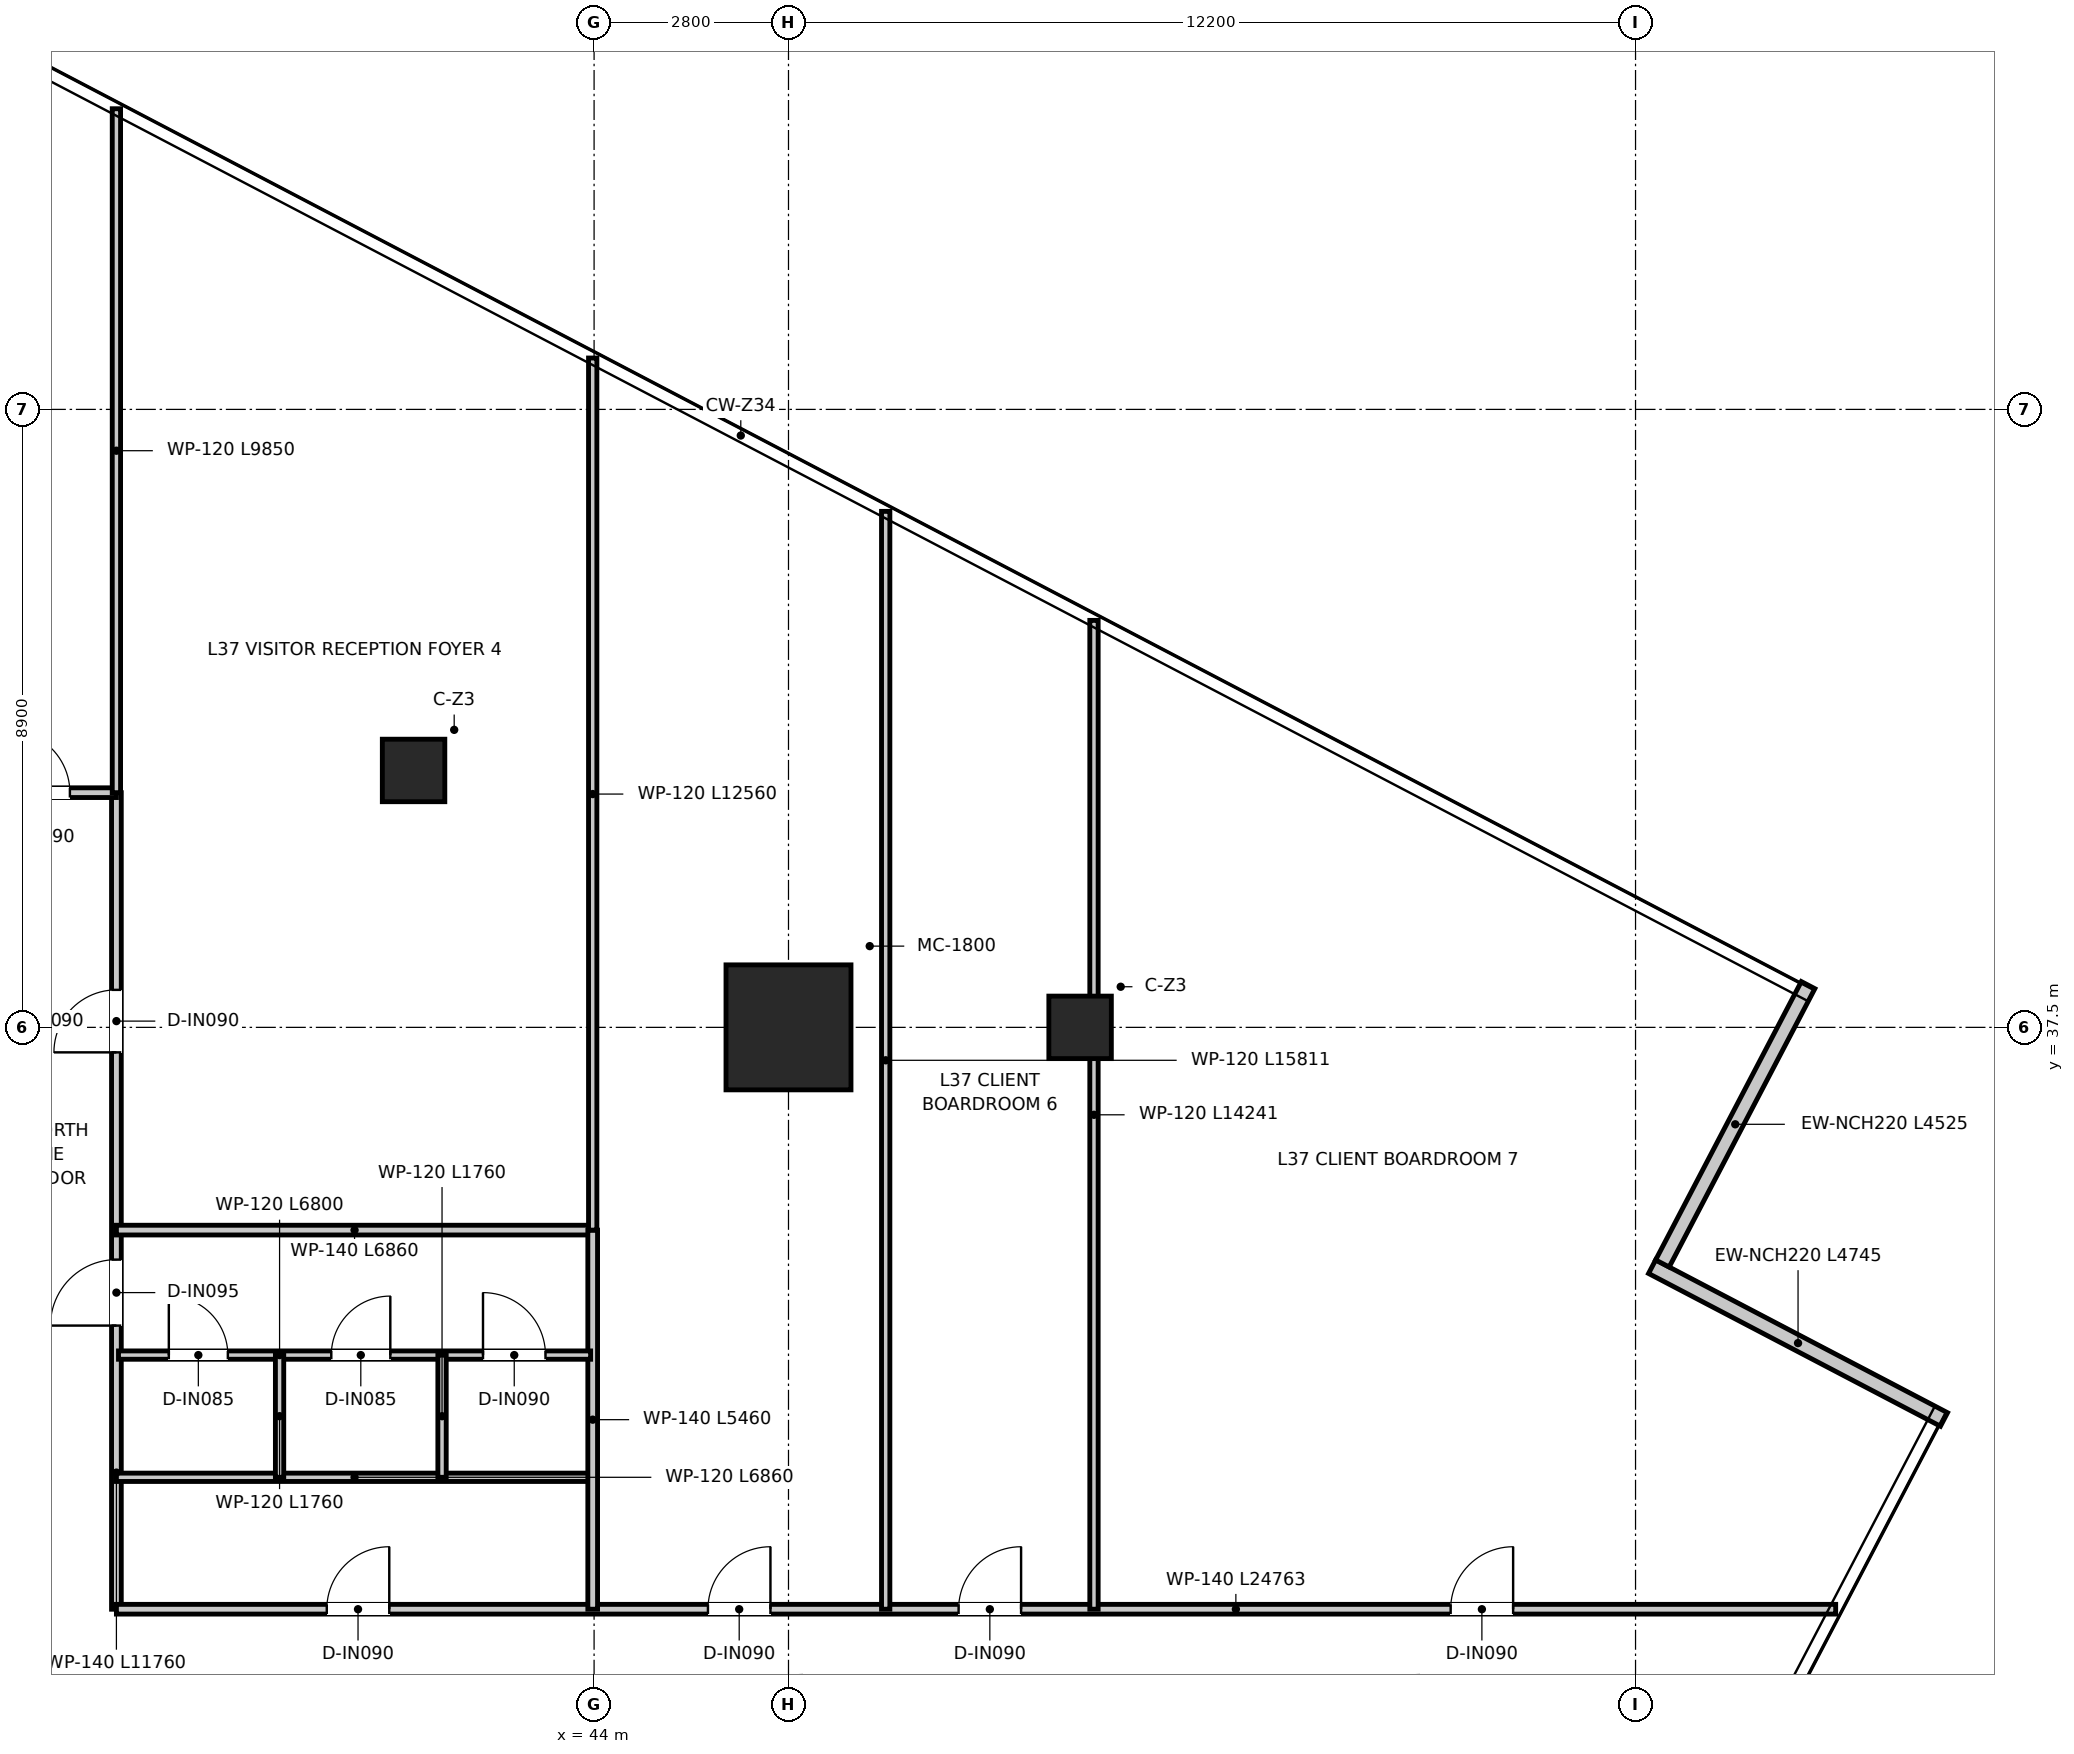
"""IFC4 building model, lengths in metres.
Left out: names, types, materials, properties, quantities, classifications, styles, units other than length and angle.
Written with IfcOpenShell. Run it as: python <this file> out.ifc"""

import sys

from ifc_helpers import new_model, si_unit, direction, frame, frame_2d, origin, origin_2d, place, context, subcontext, project, spatial, rectangle, extrude, source, transform, mapped, element, fill, save


model = new_model("IFC4")
c1 = context("Model", 3, precision=1e-05, world=origin(), true_north=direction((0.0, 1.0)))
c2 = subcontext(c1, "Body", "Model", "MODEL_VIEW")
j1 = project(units=[si_unit("LENGTHUNIT", "METRE"), si_unit("PLANEANGLEUNIT", "RADIAN")], contexts=[c1])
p1 = place(None, origin())
s1 = spatial("IfcSite", under=j1, at=p1, CompositionType="ELEMENT")
p2 = place(p1, origin())
s2 = spatial("IfcBuilding", under=s1, at=p2, CompositionType="ELEMENT")
p3 = place(p2, frame((0.0, 0.0, 154.1)))
s3 = spatial("IfcBuildingStorey", under=s2, at=p3, CompositionType="ELEMENT", Elevation=154.1)
m1 = source(origin(), c2, "Body", "SweptSolid", [
    extrude(rectangle(XDim=1.8, YDim=1.8, at=origin_2d()), origin(), (0.0, 0.0, 1.0), 3.95),
])
p4 = place(p3, frame((46.8, 37.5, 0.0), z_axis=(0.0, 0.0, 1.0), x_axis=(1.0, 0.0, 0.0)))
e1 = element("IfcColumn", 1, at=p4, inside=s3, PredefinedType="USERDEFINED", context=c2, shape_type="MappedRepresentation", body=[
    mapped(m1, transform((0.0, 0.0, 0.0), x_axis=(1.0, 0.0, 0.0), y_axis=(0.0, 1.0, 0.0), z_axis=(0.0, 0.0, 1.0), scale=1.0)),
])
m2 = source(origin(), c2, "Body", "SweptSolid", [
    extrude(rectangle(XDim=0.9, YDim=0.9, at=origin_2d()), origin(), (0.0, 0.0, 1.0), 3.95),
])
for number, where, z_axis, x_axis in (
    (2, (41.4, 41.2, 0.0), (0.0, 0.0, 1.0), (1.0, 0.0, 0.0)),
    (3, (51.0, 37.5, 0.0), (0.0, 0.0, 1.0), (1.0, 0.0, 0.0)),
):
    element("IfcColumn", number, at=place(p3, frame(where, z_axis=z_axis, x_axis=x_axis)), inside=s3, PredefinedType="COLUMN", context=c2, shape_type="MappedRepresentation", body=[
        mapped(m2, transform((0.0, 0.0, 0.0), x_axis=(1.0, 0.0, 0.0), y_axis=(0.0, 1.0, 0.0), z_axis=(0.0, 0.0, 1.0), scale=1.0)),
    ])
p5 = place(p3, frame((63.443, 31.853, 0.0), z_axis=(0.0, 0.0, 1.0), x_axis=(-0.886000663224, 0.463683970788, 0.0)))
e4 = element("IfcWall", 4, at=p5, inside=s3, PredefinedType="ELEMENTEDWALL", context=c2, shape_type="SweptSolid", body=[
    extrude(rectangle(XDim=4.745, YDim=0.22, at=frame_2d((2.373, 0.0))), origin(), (0.0, 0.0, 1.0), 3.67),
])
p6 = place(p3, frame((59.387, 34.099, 0.0), z_axis=(0.0, 0.0, 1.0), x_axis=(0.463690434653, 0.885997280363, 0.0)))
e5 = element("IfcWall", 5, at=p6, inside=s3, PredefinedType="ELEMENTEDWALL", context=c2, shape_type="SweptSolid", body=[
    extrude(rectangle(XDim=4.525, YDim=0.22, at=frame_2d((2.262, 0.0))), origin(), (0.0, 0.0, 1.0), 3.67),
])
p7 = place(p3, frame((37.12, 29.12, 0.0), z_axis=(0.0, 0.0, 1.0), x_axis=(0.0, 1.0, 0.0)))
e6 = element("IfcWall", 6, at=p7, inside=s3, PredefinedType="PARTITIONING", context=c2, shape_type="SweptSolid", body=[
    extrude(rectangle(XDim=11.76, YDim=0.14, at=frame_2d((5.88, 0.0))), origin(), (0.0, 0.0, 1.0), 3.03),
])
p8 = place(p7, frame((4.085, 0.0, 0.0)))
e7 = element("IfcOpeningElement", 7, at=p8, cuts=e6, PredefinedType="OPENING", context=c2, shape_type="SweptSolid", body=[
    extrude(rectangle(XDim=0.95, YDim=2.1, at=frame_2d((0.475, 1.05))), frame((0.0, 0.08, 0.0), z_axis=(0.0, -1.0, 0.0), x_axis=(1.0, 0.0, 0.0)), (0.0, 0.0, 1.0), 0.16),
])
p9 = place(p7, frame((8.02, 0.0, 0.0)))
e8 = element("IfcOpeningElement", 8, at=p9, cuts=e6, PredefinedType="OPENING", context=c2, shape_type="SweptSolid", body=[
    extrude(rectangle(XDim=0.9, YDim=2.1, at=frame_2d((0.45, 1.05))), frame((0.0, 0.08, 0.0), z_axis=(0.0, -1.0, 0.0), x_axis=(1.0, 0.0, 0.0)), (0.0, 0.0, 1.0), 0.16),
])
p10 = place(p3, frame((34.88, 40.88, 0.0), z_axis=(0.0, 0.0, 1.0), x_axis=(1.0, 0.0, 0.0)))
e9 = element("IfcWall", 9, at=p10, inside=s3, PredefinedType="PARTITIONING", context=c2, shape_type="SweptSolid", body=[
    extrude(rectangle(XDim=2.24, YDim=0.14, at=frame_2d((1.12, 0.0))), origin(), (0.0, 0.0, 1.0), 3.67),
])
p11 = place(p10, frame((0.67, 0.0, 0.0)))
e10 = element("IfcOpeningElement", 10, at=p11, cuts=e9, PredefinedType="OPENING", context=c2, shape_type="SweptSolid", body=[
    extrude(rectangle(XDim=0.9, YDim=2.1, at=frame_2d((0.45, 1.05))), frame((0.0, 0.08, 0.0), z_axis=(0.0, -1.0, 0.0), x_axis=(1.0, 0.0, 0.0)), (0.0, 0.0, 1.0), 0.16),
])
p12 = place(p3, frame((37.12, 29.12, 0.0), z_axis=(0.0, 0.0, 1.0), x_axis=(1.0, 0.0, 0.0)))
e11 = element("IfcWall", 11, at=p12, inside=s3, PredefinedType="PARTITIONING", context=c2, shape_type="SweptSolid", body=[
    extrude(rectangle(XDim=24.763, YDim=0.14, at=frame_2d((12.381, 0.0))), origin(), (0.0, 0.0, 1.0), 3.03),
])
p13 = place(p12, frame((3.03, 0.0, 0.0)))
e12 = element("IfcOpeningElement", 12, at=p13, cuts=e11, PredefinedType="OPENING", context=c2, shape_type="SweptSolid", body=[
    extrude(rectangle(XDim=0.9, YDim=2.1, at=frame_2d((0.45, 1.05))), frame((0.0, 0.08, 0.0), z_axis=(0.0, -1.0, 0.0), x_axis=(1.0, 0.0, 0.0)), (0.0, 0.0, 1.0), 0.16),
])
p14 = place(p12, frame((8.52, 0.0, 0.0)))
e13 = element("IfcOpeningElement", 13, at=p14, cuts=e11, PredefinedType="OPENING", context=c2, shape_type="SweptSolid", body=[
    extrude(rectangle(XDim=0.9, YDim=2.1, at=frame_2d((0.45, 1.05))), frame((0.0, 0.08, 0.0), z_axis=(0.0, -1.0, 0.0), x_axis=(1.0, 0.0, 0.0)), (0.0, 0.0, 1.0), 0.16),
])
p15 = place(p12, frame((12.13, 0.0, 0.0)))
e14 = element("IfcOpeningElement", 14, at=p15, cuts=e11, PredefinedType="OPENING", context=c2, shape_type="SweptSolid", body=[
    extrude(rectangle(XDim=0.9, YDim=2.1, at=frame_2d((0.45, 1.05))), frame((0.0, 0.08, 0.0), z_axis=(0.0, -1.0, 0.0), x_axis=(1.0, 0.0, 0.0)), (0.0, 0.0, 1.0), 0.16),
])
p16 = place(p12, frame((19.217, 0.0, 0.0)))
e15 = element("IfcOpeningElement", 15, at=p16, cuts=e11, PredefinedType="OPENING", context=c2, shape_type="SweptSolid", body=[
    extrude(rectangle(XDim=0.9, YDim=2.1, at=frame_2d((0.45, 1.05))), frame((0.0, 0.08, 0.0), z_axis=(0.0, -1.0, 0.0), x_axis=(1.0, 0.0, 0.0)), (0.0, 0.0, 1.0), 0.16),
])
p17 = place(p3, frame((37.12, 31.02, 0.0), z_axis=(0.0, 0.0, 1.0), x_axis=(1.0, 0.0, 0.0)))
e16 = element("IfcWall", 16, at=p17, inside=s3, PredefinedType="PARTITIONING", context=c2, shape_type="SweptSolid", body=[
    extrude(rectangle(XDim=6.86, YDim=0.12, at=frame_2d((3.43, 0.0))), origin(), (0.0, 0.0, 1.0), 3.08),
])
p18 = place(p3, frame((37.12, 34.58, 0.0), z_axis=(0.0, 0.0, 1.0), x_axis=(1.0, 0.0, 0.0)))
e17 = element("IfcWall", 17, at=p18, inside=s3, PredefinedType="PARTITIONING", context=c2, shape_type="SweptSolid", body=[
    extrude(rectangle(XDim=6.86, YDim=0.14, at=frame_2d((3.43, 0.0))), origin(), (0.0, 0.0, 1.0), 3.08),
])
p19 = place(p3, frame((43.98, 29.12, 0.0), z_axis=(0.0, 0.0, 1.0), x_axis=(0.0, 1.0, 0.0)))
e18 = element("IfcWall", 18, at=p19, inside=s3, PredefinedType="PARTITIONING", context=c2, shape_type="SweptSolid", body=[
    extrude(rectangle(XDim=5.46, YDim=0.14, at=frame_2d((2.73, 0.0))), origin(), (0.0, 0.0, 1.0), 3.31),
])
p20 = place(p3, frame((37.15, 32.78, 0.0), z_axis=(0.0, 0.0, 1.0), x_axis=(1.0, 0.0, 0.0)))
e19 = element("IfcWall", 19, at=p20, inside=s3, PredefinedType="PARTITIONING", context=c2, shape_type="SweptSolid", body=[
    extrude(rectangle(XDim=6.8, YDim=0.12, at=frame_2d((3.4, 0.0))), origin(), (0.0, 0.0, 1.0), 3.08),
])
p21 = place(p20, frame((0.725, 0.0, 0.0)))
e20 = element("IfcOpeningElement", 20, at=p21, cuts=e19, PredefinedType="OPENING", context=c2, shape_type="SweptSolid", body=[
    extrude(rectangle(XDim=0.85, YDim=2.1, at=frame_2d((0.425, 1.05))), frame((0.0, 0.07, 0.0), z_axis=(0.0, -1.0, 0.0), x_axis=(1.0, 0.0, 0.0)), (0.0, 0.0, 1.0), 0.14),
])
p22 = place(p20, frame((3.065, 0.0, 0.0)))
e21 = element("IfcOpeningElement", 21, at=p22, cuts=e19, PredefinedType="OPENING", context=c2, shape_type="SweptSolid", body=[
    extrude(rectangle(XDim=0.85, YDim=2.1, at=frame_2d((0.425, 1.05))), frame((0.0, 0.07, 0.0), z_axis=(0.0, -1.0, 0.0), x_axis=(1.0, 0.0, 0.0)), (0.0, 0.0, 1.0), 0.14),
])
p23 = place(p20, frame((5.25, 0.0, 0.0)))
e22 = element("IfcOpeningElement", 22, at=p23, cuts=e19, PredefinedType="OPENING", context=c2, shape_type="SweptSolid", body=[
    extrude(rectangle(XDim=0.9, YDim=2.1, at=frame_2d((0.45, 1.05))), frame((0.0, 0.07, 0.0), z_axis=(0.0, -1.0, 0.0), x_axis=(1.0, 0.0, 0.0)), (0.0, 0.0, 1.0), 0.14),
])
for number, where, z_axis, x_axis in (
    (23, (39.47, 31.02, 0.0), (0.0, 0.0, 1.0), (0.0, 1.0, 0.0)),
    (24, (41.81, 31.02, 0.0), (0.0, 0.0, 1.0), (0.0, 1.0, 0.0)),
):
    element("IfcWall", number, at=place(p3, frame(where, z_axis=z_axis, x_axis=x_axis)), inside=s3, PredefinedType="PARTITIONING", context=c2, shape_type="SweptSolid", body=[
        extrude(rectangle(XDim=1.76, YDim=0.12, at=frame_2d((0.88, 0.0))), origin(), (0.0, 0.0, 1.0), 3.67),
    ])
p24 = place(p3, frame((37.12, 40.88, 0.0), z_axis=(0.0, 0.0, 1.0), x_axis=(0.0, 1.0, 0.0)))
e25 = element("IfcWall", 25, at=p24, inside=s3, PredefinedType="PARTITIONING", context=c2, shape_type="SweptSolid", body=[
    extrude(rectangle(XDim=9.85, YDim=0.12, at=frame_2d((4.925, 0.0))), origin(), (0.0, 0.0, 1.0), 3.28),
])
p25 = place(p3, frame((43.98, 34.58, 0.0), z_axis=(0.0, 0.0, 1.0), x_axis=(0.0, 1.0, 0.0)))
e26 = element("IfcWall", 26, at=p25, inside=s3, PredefinedType="PARTITIONING", context=c2, shape_type="SweptSolid", body=[
    extrude(rectangle(XDim=12.56, YDim=0.12, at=frame_2d((6.28, 0.0))), origin(), (0.0, 0.0, 1.0), 3.03),
])
p26 = place(p3, frame((48.2, 29.12, 0.0), z_axis=(0.0, 0.0, 1.0), x_axis=(0.0, 1.0, 0.0)))
e27 = element("IfcWall", 27, at=p26, inside=s3, PredefinedType="PARTITIONING", context=c2, shape_type="SweptSolid", body=[
    extrude(rectangle(XDim=15.811, YDim=0.12, at=frame_2d((7.906, 0.0))), origin(), (0.0, 0.0, 1.0), 3.08),
])
p27 = place(p3, frame((51.2, 29.12, 0.0), z_axis=(0.0, 0.0, 1.0), x_axis=(0.0, 1.0, 0.0)))
e28 = element("IfcWall", 28, at=p27, inside=s3, PredefinedType="PARTITIONING", context=c2, shape_type="SweptSolid", body=[
    extrude(rectangle(XDim=14.241, YDim=0.12, at=frame_2d((7.121, 0.0))), origin(), (0.0, 0.0, 1.0), 3.28),
])
p28 = place(p13, origin())
e29 = element("IfcDoor", 29, at=p28, inside=s3, OperationType="SINGLE_SWING_RIGHT", PredefinedType="DOOR", context=c2, shape_type="SweptSolid", body=[
    extrude(rectangle(XDim=0.9, YDim=2.1, at=frame_2d((0.45, 1.05))), frame((0.0, 0.025, 0.0), z_axis=(0.0, -1.0, 0.0), x_axis=(1.0, 0.0, 0.0)), (0.0, 0.0, 1.0), 0.05),
])
fill(e12, e29)
p29 = place(p8, origin())
e30 = element("IfcDoor", 30, at=p29, inside=s3, OperationType="SINGLE_SWING_LEFT", PredefinedType="DOOR", context=c2, shape_type="SweptSolid", body=[
    extrude(rectangle(XDim=0.95, YDim=2.1, at=frame_2d((0.475, 1.05))), frame((0.0, 0.025, 0.0), z_axis=(0.0, -1.0, 0.0), x_axis=(1.0, 0.0, 0.0)), (0.0, 0.0, 1.0), 0.05),
])
fill(e7, e30)
p30 = place(p21, origin())
e31 = element("IfcDoor", 31, at=p30, inside=s3, OperationType="SINGLE_SWING_LEFT", PredefinedType="DOOR", context=c2, shape_type="SweptSolid", body=[
    extrude(rectangle(XDim=0.85, YDim=2.1, at=frame_2d((0.425, 1.05))), frame((0.0, 0.025, 0.0), z_axis=(0.0, -1.0, 0.0), x_axis=(1.0, 0.0, 0.0)), (0.0, 0.0, 1.0), 0.05),
])
fill(e20, e31)
p31 = place(p22, origin())
e32 = element("IfcDoor", 32, at=p31, inside=s3, OperationType="SINGLE_SWING_RIGHT", PredefinedType="DOOR", context=c2, shape_type="SweptSolid", body=[
    extrude(rectangle(XDim=0.85, YDim=2.1, at=frame_2d((0.425, 1.05))), frame((0.0, 0.025, 0.0), z_axis=(0.0, -1.0, 0.0), x_axis=(1.0, 0.0, 0.0)), (0.0, 0.0, 1.0), 0.05),
])
fill(e21, e32)
p32 = place(p23, origin())
e33 = element("IfcDoor", 33, at=p32, inside=s3, OperationType="SINGLE_SWING_LEFT", PredefinedType="DOOR", context=c2, shape_type="SweptSolid", body=[
    extrude(rectangle(XDim=0.9, YDim=2.1, at=frame_2d((0.45, 1.05))), frame((0.0, 0.025, 0.0), z_axis=(0.0, -1.0, 0.0), x_axis=(1.0, 0.0, 0.0)), (0.0, 0.0, 1.0), 0.05),
])
fill(e22, e33)
p33 = place(p11, origin())
e34 = element("IfcDoor", 34, at=p33, inside=s3, OperationType="SINGLE_SWING_LEFT", PredefinedType="DOOR", context=c2, shape_type="SweptSolid", body=[
    extrude(rectangle(XDim=0.9, YDim=2.1, at=frame_2d((0.45, 1.05))), frame((0.0, 0.025, 0.0), z_axis=(0.0, -1.0, 0.0), x_axis=(1.0, 0.0, 0.0)), (0.0, 0.0, 1.0), 0.05),
])
fill(e10, e34)
p34 = place(p9, origin())
e35 = element("IfcDoor", 35, at=p34, inside=s3, OperationType="SINGLE_SWING_LEFT", PredefinedType="DOOR", context=c2, shape_type="SweptSolid", body=[
    extrude(rectangle(XDim=0.9, YDim=2.1, at=frame_2d((0.45, 1.05))), frame((0.0, 0.025, 0.0), z_axis=(0.0, -1.0, 0.0), x_axis=(1.0, 0.0, 0.0)), (0.0, 0.0, 1.0), 0.05),
])
fill(e8, e35)
p35 = place(p14, origin())
e36 = element("IfcDoor", 36, at=p35, inside=s3, OperationType="SINGLE_SWING_RIGHT", PredefinedType="DOOR", context=c2, shape_type="SweptSolid", body=[
    extrude(rectangle(XDim=0.9, YDim=2.1, at=frame_2d((0.45, 1.05))), frame((0.0, 0.025, 0.0), z_axis=(0.0, -1.0, 0.0), x_axis=(1.0, 0.0, 0.0)), (0.0, 0.0, 1.0), 0.05),
])
fill(e13, e36)
p36 = place(p15, origin())
e37 = element("IfcDoor", 37, at=p36, inside=s3, OperationType="SINGLE_SWING_RIGHT", PredefinedType="DOOR", context=c2, shape_type="SweptSolid", body=[
    extrude(rectangle(XDim=0.9, YDim=2.1, at=frame_2d((0.45, 1.05))), frame((0.0, 0.025, 0.0), z_axis=(0.0, -1.0, 0.0), x_axis=(1.0, 0.0, 0.0)), (0.0, 0.0, 1.0), 0.05),
])
fill(e14, e37)
p37 = place(p16, origin())
e38 = element("IfcDoor", 38, at=p37, inside=s3, OperationType="SINGLE_SWING_RIGHT", PredefinedType="DOOR", context=c2, shape_type="SweptSolid", body=[
    extrude(rectangle(XDim=0.9, YDim=2.1, at=frame_2d((0.45, 1.05))), frame((0.0, 0.025, 0.0), z_axis=(0.0, -1.0, 0.0), x_axis=(1.0, 0.0, 0.0)), (0.0, 0.0, 1.0), 0.05),
])
fill(e15, e38)
save(model, sys.argv[1])
